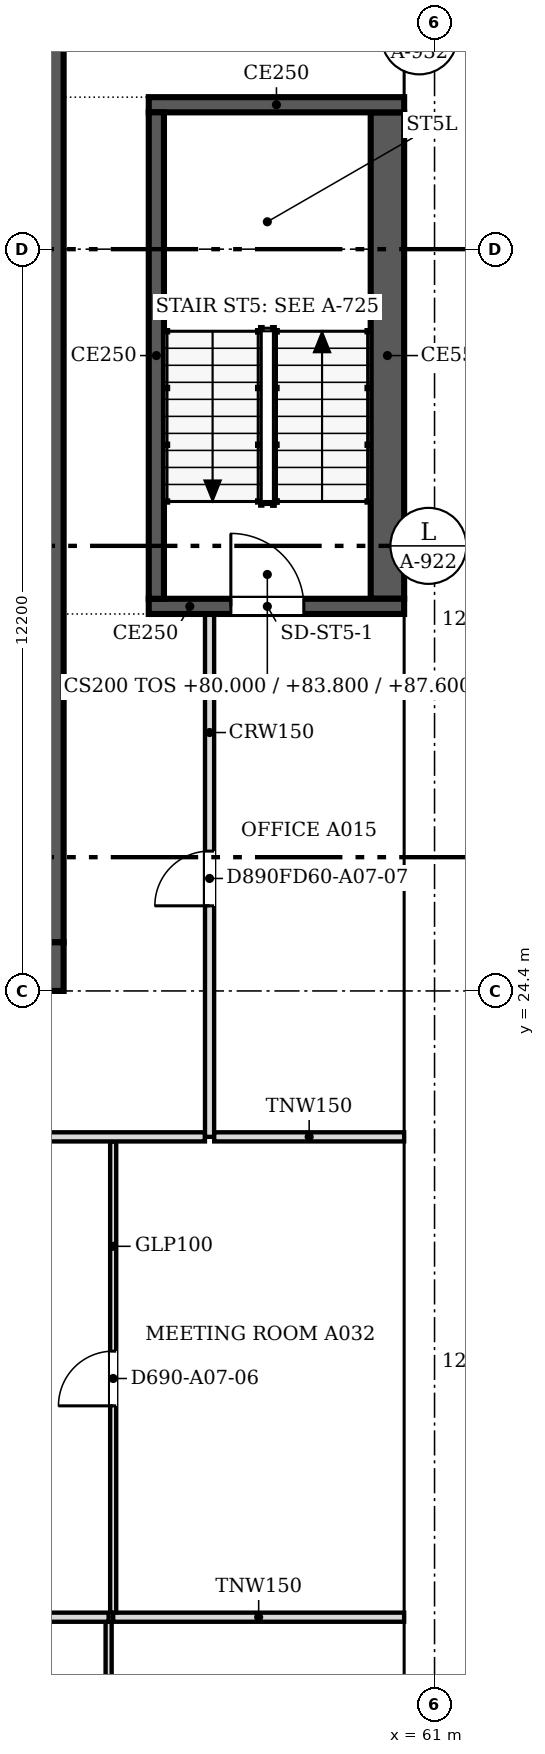
"""IFC4 building model, lengths in metres.
Left out: names, types, materials, properties, quantities, classifications, styles, units other than length and angle.
Written with IfcOpenShell. Run it as: python <this file> out.ifc"""

import sys

from ifc_helpers import new_model, si_unit, direction, frame, frame_2d, origin, place, context, subcontext, project, spatial, polyline, rectangle, outline, extrude, faceted_brep, source, transform, mapped, element, fill, save


model = new_model("IFC4")
c1 = context("Model", 3, precision=1e-05, world=origin(), true_north=direction((0.0, 1.0)))
c2 = subcontext(c1, "Body", "Model", "MODEL_VIEW")
j1 = project(units=[si_unit("LENGTHUNIT", "METRE"), si_unit("PLANEANGLEUNIT", "RADIAN")], contexts=[c1])
p1 = place(None, origin())
s1 = spatial("IfcSite", under=j1, at=p1, CompositionType="ELEMENT")
p2 = place(p1, origin())
s2 = spatial("IfcBuilding", under=s1, at=p2, CompositionType="ELEMENT")
p3 = place(p2, frame((0.0, 0.0, 80.0)))
s3 = spatial("IfcBuildingStorey", under=s2, at=p3, CompositionType="ELEMENT", Elevation=80.0)
m1 = source(origin(), c2, "Body", "SweptSolid", [
    extrude(outline(polyline([(3.05, 0.0), (6.1, 3.8), (3.05, 7.6), (0.0, 3.8), (3.05, 0.0)])), frame((0.0, 0.25, 0.0), z_axis=(0.0, -1.0, 0.0), x_axis=(1.0, 0.0, 0.0)), (0.0, 0.0, 1.0), 0.5),
])
p4 = place(p3, frame((60.75, 9.15, -3.8), z_axis=(0.0, 0.0, 1.0), x_axis=(0.0, 1.0, 0.0)))
e1 = element("IfcWall", 1, at=p4, inside=s3, PredefinedType="SOLIDWALL", context=c2, shape_type="MappedRepresentation", body=[
    mapped(m1, transform((0.0, 0.0, 0.0), scale=1.0)),
])
m2 = source(origin(), c2, "Body", "SweptSolid", [
    extrude(outline(polyline([(3.05, 0.399), (5.78, 3.8), (3.05, 7.201), (0.321, 3.8), (3.05, 0.399)])), frame((0.0, 0.26, 0.0), z_axis=(0.0, -1.0, 0.0), x_axis=(1.0, 0.0, 0.0)), (0.0, 0.0, 1.0), 0.52),
])
p5 = place(p4, origin())
e2 = element("IfcOpeningElement", 2, at=p5, cuts=e1, PredefinedType="OPENING", context=c2, shape_type="MappedRepresentation", body=[
    mapped(m2, transform((0.0, 0.0, 0.0), scale=1.0)),
])
p6 = place(p3, frame((60.75, 15.25, -3.8), z_axis=(0.0, 0.0, 1.0), x_axis=(0.0, 1.0, 0.0)))
e3 = element("IfcWall", 3, at=p6, inside=s3, PredefinedType="SOLIDWALL", context=c2, shape_type="MappedRepresentation", body=[
    mapped(m1, transform((0.0, 0.0, 0.0), scale=1.0)),
])
p7 = place(p6, origin())
e4 = element("IfcOpeningElement", 4, at=p7, cuts=e3, PredefinedType="OPENING", context=c2, shape_type="MappedRepresentation", body=[
    mapped(m2, transform((0.0, 0.0, 0.0), scale=1.0)),
])
m3 = source(origin(), c2, "Body", "Brep", [
    faceted_brep([(3.05, -0.25, 0.0), (6.1, -0.25, 3.8), (6.1, -0.25, 3.8), (3.05, -0.25, 7.6), (0.0, -0.25, 3.8), (0.0, 0.25, 3.8), (3.05, 0.25, 7.6), (6.1, 0.25, 3.8), (6.1, 0.25, 3.8), (3.05, 0.25, 0.0)], [[[0, 1, 2, 3, 4]], [[5, 6, 7, 8, 9]], [[9, 8, 1, 0]], [[7, 6, 3, 2]], [[6, 5, 4, 3]], [[5, 9, 0, 4]], [[1, 8, 7, 2]]]),
])
p8 = place(p3, frame((60.75, 21.35, -3.8), z_axis=(0.0, 0.0, 1.0), x_axis=(0.0, 1.0, 0.0)))
e5 = element("IfcWall", 5, at=p8, inside=s3, PredefinedType="SOLIDWALL", context=c2, shape_type="MappedRepresentation", body=[
    mapped(m3, transform((0.0, 0.0, 0.0), scale=1.0)),
])
p9 = place(p8, origin())
e6 = element("IfcOpeningElement", 6, at=p9, cuts=e5, PredefinedType="OPENING", context=c2, shape_type="MappedRepresentation", body=[
    mapped(m2, transform((0.0, 0.0, 0.0), scale=1.0)),
])
p10 = place(p3, frame((60.75, 27.45, -3.8), z_axis=(0.0, 0.0, 1.0), x_axis=(0.0, 1.0, 0.0)))
e7 = element("IfcWall", 7, at=p10, inside=s3, PredefinedType="SOLIDWALL", context=c2, shape_type="MappedRepresentation", body=[
    mapped(m1, transform((0.0, 0.0, 0.0), scale=1.0)),
])
p11 = place(p10, origin())
e8 = element("IfcOpeningElement", 8, at=p11, cuts=e7, PredefinedType="OPENING", context=c2, shape_type="MappedRepresentation", body=[
    mapped(m2, transform((0.0, 0.0, 0.0), scale=1.0)),
])
p12 = place(p3, frame((60.75, 33.55, -3.8), z_axis=(0.0, 0.0, 1.0), x_axis=(0.0, 1.0, 0.0)))
e9 = element("IfcWall", 9, at=p12, inside=s3, PredefinedType="SOLIDWALL", context=c2, shape_type="MappedRepresentation", body=[
    mapped(m3, transform((0.0, 0.0, 0.0), scale=1.0)),
])
p13 = place(p12, origin())
e10 = element("IfcOpeningElement", 10, at=p13, cuts=e9, PredefinedType="OPENING", context=c2, shape_type="MappedRepresentation", body=[
    mapped(m2, transform((0.0, 0.0, 0.0), scale=1.0)),
])
p14 = place(p3, frame((60.75, 39.65, -3.8), z_axis=(0.0, 0.0, 1.0), x_axis=(0.0, 1.0, 0.0)))
e11 = element("IfcWall", 11, at=p14, inside=s3, PredefinedType="SOLIDWALL", context=c2, shape_type="MappedRepresentation", body=[
    mapped(m1, transform((0.0, 0.0, 0.0), scale=1.0)),
])
p15 = place(p14, origin())
e12 = element("IfcOpeningElement", 12, at=p15, cuts=e11, PredefinedType="OPENING", context=c2, shape_type="MappedRepresentation", body=[
    mapped(m2, transform((0.0, 0.0, 0.0), scale=1.0)),
])
p16 = place(p2, frame((0.0, 0.0, 83.8)))
s4 = spatial("IfcBuildingStorey", under=s2, at=p16, CompositionType="ELEMENT", Elevation=83.8)
p17 = place(p16, frame((60.75, 12.2, -3.8), z_axis=(0.0, 0.0, 1.0), x_axis=(0.0, 1.0, 0.0)))
e13 = element("IfcWall", 13, at=p17, inside=s4, PredefinedType="SOLIDWALL", context=c2, shape_type="MappedRepresentation", body=[
    mapped(m1, transform((0.0, 0.0, 0.0), scale=1.0)),
])
p18 = place(p17, origin())
e14 = element("IfcOpeningElement", 14, at=p18, cuts=e13, PredefinedType="OPENING", context=c2, shape_type="MappedRepresentation", body=[
    mapped(m2, transform((0.0, 0.0, 0.0), scale=1.0)),
])
p19 = place(p16, frame((60.75, 18.3, -3.8), z_axis=(0.0, 0.0, 1.0), x_axis=(0.0, 1.0, 0.0)))
e15 = element("IfcWall", 15, at=p19, inside=s4, PredefinedType="SOLIDWALL", context=c2, shape_type="MappedRepresentation", body=[
    mapped(m3, transform((0.0, 0.0, 0.0), scale=1.0)),
])
p20 = place(p19, origin())
e16 = element("IfcOpeningElement", 16, at=p20, cuts=e15, PredefinedType="OPENING", context=c2, shape_type="MappedRepresentation", body=[
    mapped(m2, transform((0.0, 0.0, 0.0), scale=1.0)),
])
p21 = place(p16, frame((60.75, 24.4, -3.8), z_axis=(0.0, 0.0, 1.0), x_axis=(0.0, 1.0, 0.0)))
e17 = element("IfcWall", 17, at=p21, inside=s4, PredefinedType="SOLIDWALL", context=c2, shape_type="MappedRepresentation", body=[
    mapped(m1, transform((0.0, 0.0, 0.0), scale=1.0)),
])
p22 = place(p21, origin())
e18 = element("IfcOpeningElement", 18, at=p22, cuts=e17, PredefinedType="OPENING", context=c2, shape_type="MappedRepresentation", body=[
    mapped(m2, transform((0.0, 0.0, 0.0), scale=1.0)),
])
p23 = place(p16, frame((60.75, 30.5, -3.8), z_axis=(0.0, 0.0, 1.0), x_axis=(0.0, 1.0, 0.0)))
e19 = element("IfcWall", 19, at=p23, inside=s4, PredefinedType="SOLIDWALL", context=c2, shape_type="MappedRepresentation", body=[
    mapped(m1, transform((0.0, 0.0, 0.0), scale=1.0)),
])
p24 = place(p23, origin())
e20 = element("IfcOpeningElement", 20, at=p24, cuts=e19, PredefinedType="OPENING", context=c2, shape_type="MappedRepresentation", body=[
    mapped(m2, transform((0.0, 0.0, 0.0), scale=1.0)),
])
p25 = place(p16, frame((60.75, 36.6, -3.8), z_axis=(0.0, 0.0, 1.0), x_axis=(0.0, 1.0, 0.0)))
e21 = element("IfcWall", 21, at=p25, inside=s4, PredefinedType="SOLIDWALL", context=c2, shape_type="MappedRepresentation", body=[
    mapped(m3, transform((0.0, 0.0, 0.0), scale=1.0)),
])
p26 = place(p25, origin())
e22 = element("IfcOpeningElement", 22, at=p26, cuts=e21, PredefinedType="OPENING", context=c2, shape_type="MappedRepresentation", body=[
    mapped(m2, transform((0.0, 0.0, 0.0), scale=1.0)),
])
p27 = place(p3, frame((54.9, 24.8, 0.0), z_axis=(0.0, 0.0, 1.0), x_axis=(-1.0, 0.0, 0.0)))
e23 = element("IfcWall", 23, at=p27, inside=s3, PredefinedType="SHEAR", context=c2, shape_type="SweptSolid", body=[
    extrude(rectangle(XDim=24.4, YDim=0.8, at=frame_2d((12.2, 0.0))), origin(), (0.0, 0.0, 1.0), 3.8),
])
m4 = source(origin(), c2, "Body", "SweptSolid", [
    extrude(rectangle(XDim=1.2, YDim=2.1, at=frame_2d((0.6, 1.05))), frame((0.0, 0.41, 0.0), z_axis=(0.0, -1.0, 0.0), x_axis=(1.0, 0.0, 0.0)), (0.0, 0.0, 1.0), 0.82),
])
p28 = place(p27, frame((1.5, 0.0, 0.0)))
e24 = element("IfcOpeningElement", 24, at=p28, cuts=e23, PredefinedType="OPENING", context=c2, shape_type="MappedRepresentation", body=[
    mapped(m4, transform((0.0, 0.0, 0.0), scale=1.0)),
])
p29 = place(p3, frame((54.5, 48.0, 0.0), z_axis=(0.0, 0.0, 1.0), x_axis=(0.0, -1.0, 0.0)))
e25 = element("IfcWall", 25, at=p29, inside=s3, PredefinedType="SHEAR", context=c2, shape_type="SweptSolid", body=[
    extrude(rectangle(XDim=22.8, YDim=0.8, at=frame_2d((11.4, 0.0))), origin(), (0.0, 0.0, 1.0), 3.8),
])
p30 = place(p29, frame((4.7, 0.0, 0.0)))
e26 = element("IfcOpeningElement", 26, at=p30, cuts=e25, PredefinedType="OPENING", context=c2, shape_type="MappedRepresentation", body=[
    mapped(m4, transform((0.0, 0.0, 0.0), scale=1.0)),
])
p31 = place(p3, frame((60.5, 30.725, 0.0), z_axis=(0.0, 0.0, 1.0), x_axis=(-1.0, 0.0, 0.0)))
e27 = element("IfcWall", 27, at=p31, inside=s3, PredefinedType="SOLIDWALL", context=c2, shape_type="SweptSolid", body=[
    extrude(rectangle(XDim=4.2, YDim=0.25, at=frame_2d((2.1, 0.0))), origin(), (0.0, 0.0, 1.0), 3.8),
])
m5 = source(origin(), c2, "Body", "SweptSolid", [
    extrude(rectangle(XDim=1.2, YDim=2.1, at=frame_2d((0.6, 1.05))), frame((0.0, 0.135, 0.0), z_axis=(0.0, -1.0, 0.0), x_axis=(1.0, 0.0, 0.0)), (0.0, 0.0, 1.0), 0.27),
])
p32 = place(p31, frame((1.65, 0.0, 0.0)))
e28 = element("IfcOpeningElement", 28, at=p32, cuts=e27, PredefinedType="OPENING", context=c2, shape_type="MappedRepresentation", body=[
    mapped(m5, transform((0.0, 0.0, 0.0), scale=1.0)),
])
p33 = place(p3, frame((56.425, 30.85, 0.0), z_axis=(0.0, 0.0, 1.0), x_axis=(0.0, 1.0, 0.0)))
e29 = element("IfcWall", 29, at=p33, inside=s3, PredefinedType="SOLIDWALL", context=c2, shape_type="SweptSolid", body=[
    extrude(rectangle(XDim=8.0, YDim=0.25, at=frame_2d((4.0, 0.0))), origin(), (0.0, 0.0, 1.0), 3.8),
])
p34 = place(p3, frame((56.3, 38.975, 0.0), z_axis=(0.0, 0.0, 1.0), x_axis=(1.0, 0.0, 0.0)))
e30 = element("IfcWall", 30, at=p34, inside=s3, PredefinedType="SOLIDWALL", context=c2, shape_type="SweptSolid", body=[
    extrude(rectangle(XDim=4.2, YDim=0.25, at=frame_2d((2.1, 0.0))), origin(), (0.0, 0.0, 1.0), 3.8),
])
p35 = place(p3, frame((60.225, 38.85, 0.0), z_axis=(0.0, 0.0, 1.0), x_axis=(0.0, -1.0, 0.0)))
e31 = element("IfcWall", 31, at=p35, inside=s3, PredefinedType="SOLIDWALL", context=c2, shape_type="SweptSolid", body=[
    extrude(rectangle(XDim=8.0, YDim=0.55, at=frame_2d((4.0, 0.0))), origin(), (0.0, 0.0, 1.0), 3.8),
])
p36 = place(p3, frame((55.64, 14.024, 0.0), z_axis=(0.0, 0.0, 1.0), x_axis=(0.0, -1.0, 0.0)))
e32 = element("IfcWall", 32, at=p36, inside=s3, PredefinedType="PARTITIONING", context=c2, shape_type="SweptSolid", body=[
    extrude(rectangle(XDim=5.924, YDim=0.1, at=frame_2d((2.962, 0.0))), origin(), (0.0, 0.0, 1.0), 3.067),
])
m6 = source(origin(), c2, "Body", "SweptSolid", [
    extrude(rectangle(XDim=0.9, YDim=2.1, at=frame_2d((0.45, 1.05))), frame((0.0, 0.06, 0.0), z_axis=(0.0, -1.0, 0.0), x_axis=(1.0, 0.0, 0.0)), (0.0, 0.0, 1.0), 0.12),
])
p37 = place(p36, frame((2.524, 0.0, 0.0)))
e33 = element("IfcOpeningElement", 33, at=p37, cuts=e32, PredefinedType="OPENING", context=c2, shape_type="MappedRepresentation", body=[
    mapped(m6, transform((0.0, 0.0, 0.0), scale=1.0)),
])
p38 = place(p3, frame((46.476, 14.1, 0.0), z_axis=(0.0, 0.0, 1.0), x_axis=(1.0, 0.0, 0.0)))
e34 = element("IfcWall", 34, at=p38, inside=s3, PredefinedType="PARTITIONING", context=c2, shape_type="SweptSolid", body=[
    extrude(rectangle(XDim=9.164, YDim=0.15, at=frame_2d((4.582, 0.0))), origin(), (0.0, 0.0, 1.0), 3.067),
])
p39 = place(p3, frame((55.715, 14.1, 0.0), z_axis=(0.0, 0.0, 1.0), x_axis=(1.0, 0.0, 0.0)))
e35 = element("IfcWall", 35, at=p39, inside=s3, PredefinedType="PARTITIONING", context=c2, shape_type="SweptSolid", body=[
    extrude(rectangle(XDim=4.785, YDim=0.15, at=frame_2d((2.393, 0.0))), origin(), (0.0, 0.0, 1.0), 3.067),
])
p40 = place(p3, frame((55.715, 21.924, 0.0), z_axis=(0.0, 0.0, 1.0), x_axis=(0.0, -1.0, 0.0)))
e36 = element("IfcWall", 36, at=p40, inside=s3, PredefinedType="PARTITIONING", context=c2, shape_type="SweptSolid", body=[
    extrude(rectangle(XDim=7.748, YDim=0.1, at=frame_2d((3.874, 0.0))), origin(), (0.0, 0.0, 1.0), 3.067),
])
p41 = place(p40, frame((3.448, 0.0, 0.0)))
e37 = element("IfcOpeningElement", 37, at=p41, cuts=e36, PredefinedType="OPENING", context=c2, shape_type="MappedRepresentation", body=[
    mapped(m6, transform((0.0, 0.0, 0.0), scale=1.0)),
])
p42 = place(p3, frame((46.4, 22.0, 0.0), z_axis=(0.0, 0.0, 1.0), x_axis=(1.0, 0.0, 0.0)))
e38 = element("IfcWall", 38, at=p42, inside=s3, PredefinedType="PARTITIONING", context=c2, shape_type="SweptSolid", body=[
    extrude(rectangle(XDim=10.824, YDim=0.15, at=frame_2d((5.412, 0.0))), origin(), (0.0, 0.0, 1.0), 3.067),
])
p43 = place(p3, frame((57.3, 30.6, 0.0), z_axis=(0.0, 0.0, 1.0), x_axis=(0.0, -1.0, 0.0)))
e39 = element("IfcWall", 39, at=p43, inside=s3, PredefinedType="PARTITIONING", context=c2, shape_type="SweptSolid", body=[
    extrude(rectangle(XDim=8.6, YDim=0.15, at=frame_2d((4.3, 0.0))), origin(), (0.0, 0.0, 1.0), 3.067),
])
m7 = source(origin(), c2, "Body", "SweptSolid", [
    extrude(rectangle(XDim=0.9, YDim=2.1, at=frame_2d((0.45, 1.05))), frame((0.0, 0.085, 0.0), z_axis=(0.0, -1.0, 0.0), x_axis=(1.0, 0.0, 0.0)), (0.0, 0.0, 1.0), 0.17),
])
p44 = place(p43, frame((3.9, 0.0, 0.0)))
e40 = element("IfcOpeningElement", 40, at=p44, cuts=e39, PredefinedType="OPENING", context=c2, shape_type="MappedRepresentation", body=[
    mapped(m7, transform((0.0, 0.0, 0.0), scale=1.0)),
])
p45 = place(p3, frame((57.376, 22.0, 0.0), z_axis=(0.0, 0.0, 1.0), x_axis=(1.0, 0.0, 0.0)))
e41 = element("IfcWall", 41, at=p45, inside=s3, PredefinedType="PARTITIONING", context=c2, shape_type="SweptSolid", body=[
    extrude(rectangle(XDim=3.124, YDim=0.15, at=frame_2d((1.562, 0.0))), origin(), (0.0, 0.0, 1.0), 3.067),
])
m8 = source(origin(), c2, "Body", "SweptSolid", [
    extrude(rectangle(XDim=1.2, YDim=2.1, at=frame_2d((0.6, 1.05))), frame((0.0, 0.025, 0.0), z_axis=(0.0, -1.0, 0.0), x_axis=(1.0, 0.0, 0.0)), (0.0, 0.0, 1.0), 0.05),
])
p46 = place(p32, origin())
e42 = element("IfcDoor", 42, at=p46, inside=s3, OperationType="SINGLE_SWING_RIGHT", PredefinedType="DOOR", context=c2, shape_type="MappedRepresentation", body=[
    mapped(m8, transform((0.0, 0.0, 0.0), scale=1.0)),
])
fill(e28, e42)
m9 = source(origin(), c2, "Body", "SweptSolid", [
    extrude(rectangle(XDim=0.9, YDim=2.1, at=frame_2d((0.45, 1.05))), frame((0.0, 0.025, 0.0), z_axis=(0.0, -1.0, 0.0), x_axis=(1.0, 0.0, 0.0)), (0.0, 0.0, 1.0), 0.05),
])
p47 = place(p41, origin())
e43 = element("IfcDoor", 43, at=p47, inside=s3, OperationType="SINGLE_SWING_RIGHT", PredefinedType="DOOR", context=c2, shape_type="MappedRepresentation", body=[
    mapped(m9, transform((0.0, 0.0, 0.0), scale=1.0)),
])
fill(e37, e43)
p48 = place(p44, origin())
e44 = element("IfcDoor", 44, at=p48, inside=s3, OperationType="SINGLE_SWING_RIGHT", PredefinedType="DOOR", context=c2, shape_type="MappedRepresentation", body=[
    mapped(m9, transform((0.0, 0.0, 0.0), scale=1.0)),
])
fill(e40, e44)
save(model, sys.argv[1])
